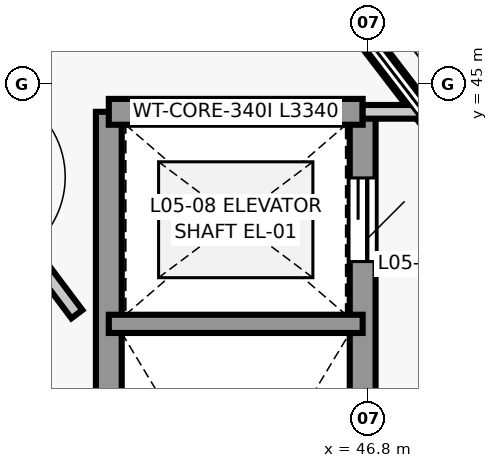
"""IFC4 building model, lengths in metres.
Left out: names, types, materials, properties, quantities, classifications, styles, units other than length and angle.
Written with IfcOpenShell. Run it as: python <this file> out.ifc"""

import sys

from ifc_helpers import new_model, si_unit, direction, frame, frame_2d, origin, place, context, subcontext, project, spatial, rectangle, extrude, element, fill, save


model = new_model("IFC4")
c1 = context("Model", 3, precision=1e-05, world=origin(), true_north=direction((0.0, 1.0)))
c2 = subcontext(c1, "Body", "Model", "MODEL_VIEW")
j1 = project(units=[si_unit("LENGTHUNIT", "METRE"), si_unit("PLANEANGLEUNIT", "RADIAN")], contexts=[c1])
p1 = place(None, origin())
s1 = spatial("IfcSite", under=j1, at=p1, CompositionType="ELEMENT")
p2 = place(p1, origin())
s2 = spatial("IfcBuilding", under=s1, at=p2, CompositionType="ELEMENT")
p3 = place(p2, frame((0.0, 0.0, 20.4)))
s3 = spatial("IfcBuildingStorey", under=s2, at=p3, CompositionType="ELEMENT", Elevation=20.4)
p4 = place(p3, frame((45.042, 33.371, 0.0), z_axis=(0.0, 0.0, 1.0), x_axis=(-0.608753590889, 0.79335935463, 0.0)))
e1 = element("IfcWall", 1, at=p4, inside=s3, PredefinedType="STANDARD", context=c2, shape_type="SweptSolid", body=[
    extrude(rectangle(XDim=10.852, YDim=0.28, at=frame_2d((5.426, 0.0))), origin(), (0.0, 0.0, 1.0), 0.82),
])
p5 = place(p3, frame((45.999, 46.62, 0.0), z_axis=(0.0, 0.0, 1.0), x_axis=(0.608769580289, -0.793347085527, 0.0)))
e2 = element("IfcWall", 2, at=p5, inside=s3, PredefinedType="STANDARD", context=c2, shape_type="SweptSolid", body=[
    extrude(rectangle(XDim=9.005, YDim=0.25, at=frame_2d((4.502, 0.0))), origin(), (0.0, 0.0, 1.0), 0.82),
])
p6 = place(p3, frame((46.731, 44.63, 0.0), z_axis=(0.0, 0.0, 1.0), x_axis=(0.0, -1.0, 0.0)))
e3 = element("IfcWall", 3, at=p6, inside=s3, PredefinedType="SHEAR", context=c2, shape_type="SweptSolid", body=[
    extrude(rectangle(XDim=9.73, YDim=0.34, at=frame_2d((4.865, 0.0))), origin(), (0.0, 0.0, 1.0), 3.9),
])
p7 = place(p6, frame((8.265, 0.0, 0.0)))
e4 = element("IfcOpeningElement", 4, at=p7, cuts=e3, PredefinedType="OPENING", context=c2, shape_type="SweptSolid", body=[
    extrude(rectangle(XDim=1.15, YDim=2.15, at=frame_2d((0.575, 1.075))), frame((0.0, 0.18, 0.0), z_axis=(0.0, -1.0, 0.0), x_axis=(1.0, 0.0, 0.0)), (0.0, 0.0, 1.0), 0.36),
])
p8 = place(p6, frame((0.87, 0.0, 0.0)))
e5 = element("IfcOpeningElement", 5, at=p8, cuts=e3, PredefinedType="OPENING", context=c2, shape_type="SweptSolid", body=[
    extrude(rectangle(XDim=1.1, YDim=2.15, at=frame_2d((0.55, 1.075))), frame((0.0, 0.18, 0.0), z_axis=(0.0, -1.0, 0.0), x_axis=(1.0, 0.0, 0.0)), (0.0, 0.0, 1.0), 0.36),
])
p9 = place(p3, frame((43.391, 34.9, 0.0), z_axis=(0.0, 0.0, 1.0), x_axis=(0.0, 1.0, 0.0)))
e6 = element("IfcWall", 6, at=p9, inside=s3, PredefinedType="SHEAR", context=c2, shape_type="SweptSolid", body=[
    extrude(rectangle(XDim=9.73, YDim=0.34, at=frame_2d((4.865, 0.0))), origin(), (0.0, 0.0, 1.0), 3.9),
])
p10 = place(p3, frame((43.391, 44.63, 0.0), z_axis=(0.0, 0.0, 1.0), x_axis=(1.0, 0.0, 0.0)))
e7 = element("IfcWall", 7, at=p10, inside=s3, PredefinedType="SHEAR", context=c2, shape_type="SweptSolid", body=[
    extrude(rectangle(XDim=3.34, YDim=0.34, at=frame_2d((1.67, 0.0))), origin(), (0.0, 0.0, 1.0), 3.9),
])
p11 = place(p3, frame((46.731, 41.84, 0.0), z_axis=(0.0, 0.0, 1.0), x_axis=(-1.0, 0.0, 0.0)))
e8 = element("IfcWall", 8, at=p11, inside=s3, PredefinedType="SHEAR", context=c2, shape_type="SweptSolid", body=[
    extrude(rectangle(XDim=3.34, YDim=0.24, at=frame_2d((1.67, 0.0))), origin(), (0.0, 0.0, 1.0), 3.9),
])
p12 = place(p3, frame((46.731, 44.63, 0.0), z_axis=(0.0, 0.0, 1.0), x_axis=(1.0, 0.0, 0.0)))
e9 = element("IfcWall", 9, at=p12, inside=s3, PredefinedType="PARTITIONING", context=c2, shape_type="SweptSolid", body=[
    extrude(rectangle(XDim=2.25, YDim=0.18, at=frame_2d((1.125, 0.0))), origin(), (0.0, 0.0, 1.0), 3.675),
])
p13 = place(p3, frame((40.984, 44.618, 0.0), z_axis=(0.0, 0.0, 1.0), x_axis=(0.599787742898, -0.800159148838, 0.0)))
e10 = element("IfcWall", 10, at=p13, inside=s3, PredefinedType="PARTITIONING", context=c2, shape_type="SweptSolid", body=[
    extrude(rectangle(XDim=3.313, YDim=0.18, at=frame_2d((1.656, 0.0))), origin(), (0.0, 0.0, 1.0), 3.675),
])
p14 = place(p13, frame((1.056, 0.0, 0.0)))
e11 = element("IfcOpeningElement", 11, at=p14, cuts=e10, PredefinedType="OPENING", context=c2, shape_type="SweptSolid", body=[
    extrude(rectangle(XDim=1.2, YDim=2.15, at=frame_2d((0.6, 1.075))), frame((0.0, 0.1, 0.0), z_axis=(0.0, -1.0, 0.0), x_axis=(1.0, 0.0, 0.0)), (0.0, 0.0, 1.0), 0.2),
])
p15 = place(p8, origin())
e12 = element("IfcDoor", 12, at=p15, inside=s3, OperationType="SLIDING_TO_LEFT", PredefinedType="DOOR", context=c2, shape_type="SweptSolid", body=[
    extrude(rectangle(XDim=1.1, YDim=2.15, at=frame_2d((0.55, 1.075))), frame((0.0, 0.025, 0.0), z_axis=(0.0, -1.0, 0.0), x_axis=(1.0, 0.0, 0.0)), (0.0, 0.0, 1.0), 0.05),
])
fill(e5, e12)
save(model, sys.argv[1])
